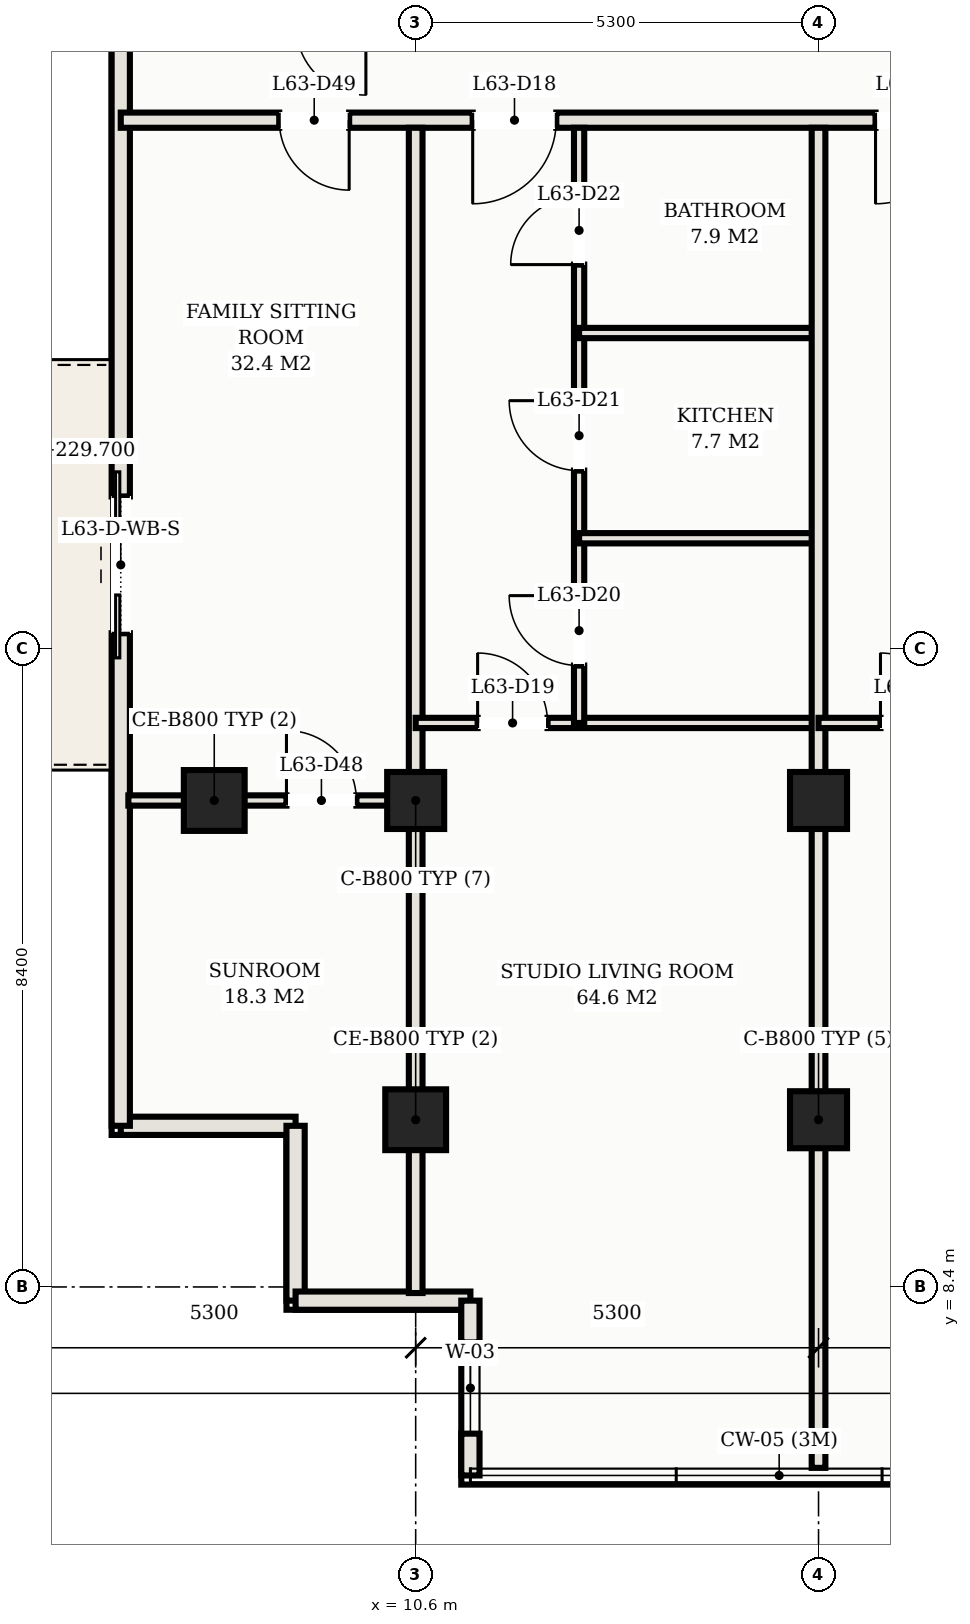
"""IFC4 building model, lengths in metres.
Left out: names, types, materials, properties, quantities, classifications, styles, units other than length and angle.
Written with IfcOpenShell. Run it as: python <this file> out.ifc"""

import sys

from ifc_helpers import new_model, si_unit, direction, frame, frame_2d, origin, origin_2d, place, context, subcontext, project, spatial, rectangle, hollow_rectangle, extrude, element, fill, save


model = new_model("IFC4")
c1 = context("Model", 3, precision=1e-05, world=origin(), true_north=direction((0.0, 1.0)))
c2 = subcontext(c1, "Body", "Model", "MODEL_VIEW")
j1 = project(units=[si_unit("LENGTHUNIT", "METRE"), si_unit("PLANEANGLEUNIT", "RADIAN")], contexts=[c1])
p1 = place(None, origin())
s1 = spatial("IfcSite", under=j1, at=p1, CompositionType="ELEMENT")
p2 = place(p1, origin())
s2 = spatial("IfcBuilding", under=s1, at=p2, CompositionType="ELEMENT")
p3 = place(p2, frame((0.0, 0.0, 229.7)))
s3 = spatial("IfcBuildingStorey", under=s2, at=p3, CompositionType="ELEMENT", Elevation=229.7)
p4 = place(p3, frame((10.6, 14.8, 0.0), z_axis=(0.0, 0.0, 1.0), x_axis=(1.0, 0.0, 0.0)))
e1 = element("IfcColumn", 1, at=p4, inside=s3, PredefinedType="COLUMN", context=c2, shape_type="SweptSolid", body=[
    extrude(hollow_rectangle(XDim=0.75, YDim=0.75, WallThickness=0.025, at=origin_2d()), origin(), (0.0, 0.0, 1.0), 3.3),
])
p5 = place(p3, frame((10.6, 10.6, 0.0), z_axis=(0.0, 0.0, 1.0), x_axis=(1.0, 0.0, 0.0)))
e2 = element("IfcColumn", 2, at=p5, inside=s3, PredefinedType="COLUMN", context=c2, shape_type="SweptSolid", body=[
    extrude(hollow_rectangle(XDim=0.8, YDim=0.8, WallThickness=0.028, at=origin_2d()), origin(), (0.0, 0.0, 1.0), 3.3),
])
for number, where, z_axis, x_axis in (
    (3, (15.9, 14.8, 0.0), (0.0, 0.0, 1.0), (1.0, 0.0, 0.0)),
    (4, (15.9, 10.6, 0.0), (0.0, 0.0, 1.0), (1.0, 0.0, 0.0)),
):
    element("IfcColumn", number, at=place(p3, frame(where, z_axis=z_axis, x_axis=x_axis)), inside=s3, PredefinedType="COLUMN", context=c2, shape_type="SweptSolid", body=[
        extrude(hollow_rectangle(XDim=0.75, YDim=0.75, WallThickness=0.025, at=origin_2d()), origin(), (0.0, 0.0, 1.0), 3.3),
    ])
p6 = place(p3, frame((7.95, 14.8, 0.0), z_axis=(0.0, 0.0, 1.0), x_axis=(1.0, 0.0, 0.0)))
e5 = element("IfcColumn", 5, at=p6, inside=s3, PredefinedType="COLUMN", context=c2, shape_type="SweptSolid", body=[
    extrude(hollow_rectangle(XDim=0.8, YDim=0.8, WallThickness=0.028, at=origin_2d()), origin(), (0.0, 0.0, 1.0), 3.264),
])
for number, where, z_axis, x_axis in (
    (6, (6.72, 10.52, 0.0), (0.0, 0.0, 1.0), (1.0, 0.0, 0.0)),
    (7, (9.02, 10.52, 0.0), (0.0, 0.0, 1.0), (0.0, -1.0, 0.0)),
    (8, (9.02, 8.22, 0.0), (0.0, 0.0, 1.0), (1.0, 0.0, 0.0)),
):
    element("IfcWall", number, at=place(p3, frame(where, z_axis=z_axis, x_axis=x_axis)), inside=s3, PredefinedType="SOLIDWALL", context=c2, shape_type="SweptSolid", body=[
        extrude(rectangle(XDim=2.3, YDim=0.24, at=frame_2d((1.15, 0.0))), origin(), (0.0, 0.0, 1.0), 3.11),
    ])
p7 = place(p3, frame((11.32, 8.22, 0.0), z_axis=(0.0, 0.0, 1.0), x_axis=(0.0, -1.0, 0.0)))
e9 = element("IfcWall", 9, at=p7, inside=s3, PredefinedType="SOLIDWALL", context=c2, shape_type="SweptSolid", body=[
    extrude(rectangle(XDim=2.3, YDim=0.24, at=frame_2d((1.15, 0.0))), origin(), (0.0, 0.0, 1.0), 3.11),
])
p8 = place(p7, frame((0.55, 0.0, 0.75)))
e10 = element("IfcOpeningElement", 10, at=p8, cuts=e9, PredefinedType="OPENING", context=c2, shape_type="SweptSolid", body=[
    extrude(rectangle(XDim=1.2, YDim=1.5, at=frame_2d((0.6, 0.75))), frame((0.0, 0.13, 0.0), z_axis=(0.0, -1.0, 0.0), x_axis=(1.0, 0.0, 0.0)), (0.0, 0.0, 1.0), 0.26),
])
p9 = place(p3, frame((6.72, 36.93, 0.0), z_axis=(0.0, 0.0, 1.0), x_axis=(0.0, -1.0, 0.0)))
e11 = element("IfcWall", 11, at=p9, inside=s3, PredefinedType="SOLIDWALL", context=c2, shape_type="SweptSolid", body=[
    extrude(rectangle(XDim=26.41, YDim=0.24, at=frame_2d((13.205, 0.0))), origin(), (0.0, 0.0, 1.0), 3.11),
])
p10 = place(p9, frame((18.13, 0.0, 0.0)))
e12 = element("IfcOpeningElement", 12, at=p10, cuts=e11, PredefinedType="OPENING", context=c2, shape_type="SweptSolid", body=[
    extrude(rectangle(XDim=1.8, YDim=2.2, at=frame_2d((0.9, 1.1))), frame((0.0, 0.13, 0.0), z_axis=(0.0, -1.0, 0.0), x_axis=(1.0, 0.0, 0.0)), (0.0, 0.0, 1.0), 0.26),
])
p11 = place(p3, frame((6.72, 23.75, 0.0), z_axis=(0.0, 0.0, 1.0), x_axis=(1.0, 0.0, 0.0)))
e13 = element("IfcWall", 13, at=p11, inside=s3, PredefinedType="PARTITIONING", context=c2, shape_type="SweptSolid", body=[
    extrude(rectangle(XDim=39.56, YDim=0.2, at=frame_2d((19.78, 0.0))), origin(), (0.0, 0.0, 1.0), 2.43),
])
p12 = place(p11, frame((4.63, 0.0, 0.0)))
e14 = element("IfcOpeningElement", 14, at=p12, cuts=e13, PredefinedType="OPENING", context=c2, shape_type="SweptSolid", body=[
    extrude(rectangle(XDim=1.1, YDim=2.25, at=frame_2d((0.55, 1.125))), frame((0.0, 0.11, 0.0), z_axis=(0.0, -1.0, 0.0), x_axis=(1.0, 0.0, 0.0)), (0.0, 0.0, 1.0), 0.22),
])
p13 = place(p11, frame((9.93, 0.0, 0.0)))
e15 = element("IfcOpeningElement", 15, at=p13, cuts=e13, PredefinedType="OPENING", context=c2, shape_type="SweptSolid", body=[
    extrude(rectangle(XDim=1.1, YDim=2.25, at=frame_2d((0.55, 1.125))), frame((0.0, 0.11, 0.0), z_axis=(0.0, -1.0, 0.0), x_axis=(1.0, 0.0, 0.0)), (0.0, 0.0, 1.0), 0.22),
])
p14 = place(p11, frame((15.23, 0.0, 0.0)))
e16 = element("IfcOpeningElement", 16, at=p14, cuts=e13, PredefinedType="OPENING", context=c2, shape_type="SweptSolid", body=[
    extrude(rectangle(XDim=1.1, YDim=2.25, at=frame_2d((0.55, 1.125))), frame((0.0, 0.11, 0.0), z_axis=(0.0, -1.0, 0.0), x_axis=(1.0, 0.0, 0.0)), (0.0, 0.0, 1.0), 0.22),
])
p15 = place(p11, frame((20.73, 0.0, 0.0)))
e17 = element("IfcOpeningElement", 17, at=p15, cuts=e13, PredefinedType="OPENING", context=c2, shape_type="SweptSolid", body=[
    extrude(rectangle(XDim=1.1, YDim=2.25, at=frame_2d((0.55, 1.125))), frame((0.0, 0.11, 0.0), z_axis=(0.0, -1.0, 0.0), x_axis=(1.0, 0.0, 0.0)), (0.0, 0.0, 1.0), 0.22),
])
p16 = place(p11, frame((25.83, 0.0, 0.0)))
e18 = element("IfcOpeningElement", 18, at=p16, cuts=e13, PredefinedType="OPENING", context=c2, shape_type="SweptSolid", body=[
    extrude(rectangle(XDim=1.1, YDim=2.25, at=frame_2d((0.55, 1.125))), frame((0.0, 0.11, 0.0), z_axis=(0.0, -1.0, 0.0), x_axis=(1.0, 0.0, 0.0)), (0.0, 0.0, 1.0), 0.22),
])
p17 = place(p11, frame((31.13, 0.0, 0.0)))
e19 = element("IfcOpeningElement", 19, at=p17, cuts=e13, PredefinedType="OPENING", context=c2, shape_type="SweptSolid", body=[
    extrude(rectangle(XDim=1.1, YDim=2.25, at=frame_2d((0.55, 1.125))), frame((0.0, 0.11, 0.0), z_axis=(0.0, -1.0, 0.0), x_axis=(1.0, 0.0, 0.0)), (0.0, 0.0, 1.0), 0.22),
])
p18 = place(p11, frame((2.085, 0.0, 0.0)))
e20 = element("IfcOpeningElement", 20, at=p18, cuts=e13, PredefinedType="OPENING", context=c2, shape_type="SweptSolid", body=[
    extrude(rectangle(XDim=0.92, YDim=2.15, at=frame_2d((0.46, 1.075))), frame((0.0, 0.11, 0.0), z_axis=(0.0, -1.0, 0.0), x_axis=(1.0, 0.0, 0.0)), (0.0, 0.0, 1.0), 0.22),
])
p19 = place(p11, frame((36.555, 0.0, 0.0)))
e21 = element("IfcOpeningElement", 21, at=p19, cuts=e13, PredefinedType="OPENING", context=c2, shape_type="SweptSolid", body=[
    extrude(rectangle(XDim=0.92, YDim=2.15, at=frame_2d((0.46, 1.075))), frame((0.0, 0.11, 0.0), z_axis=(0.0, -1.0, 0.0), x_axis=(1.0, 0.0, 0.0)), (0.0, 0.0, 1.0), 0.22),
])
p20 = place(p3, frame((10.6, 8.32, 0.0), z_axis=(0.0, 0.0, 1.0), x_axis=(0.0, 1.0, 0.0)))
e22 = element("IfcWall", 22, at=p20, inside=s3, PredefinedType="PARTITIONING", context=c2, shape_type="SweptSolid", body=[
    extrude(rectangle(XDim=15.33, YDim=0.18, at=frame_2d((7.665, 0.0))), origin(), (0.0, 0.0, 1.0), 2.43),
])
p21 = place(p3, frame((10.6, 15.82, 0.0), z_axis=(0.0, 0.0, 1.0), x_axis=(1.0, 0.0, 0.0)))
e23 = element("IfcWall", 23, at=p21, inside=s3, PredefinedType="PARTITIONING", context=c2, shape_type="SweptSolid", body=[
    extrude(rectangle(XDim=5.3, YDim=0.135, at=frame_2d((2.65, 0.0))), origin(), (0.0, 0.0, 1.0), 2.43),
])
p22 = place(p21, frame((0.815, 0.0, 0.0)))
e24 = element("IfcOpeningElement", 24, at=p22, cuts=e23, PredefinedType="OPENING", context=c2, shape_type="SweptSolid", body=[
    extrude(rectangle(XDim=0.92, YDim=2.15, at=frame_2d((0.46, 1.075))), frame((0.0, 0.078, 0.0), z_axis=(0.0, -1.0, 0.0), x_axis=(1.0, 0.0, 0.0)), (0.0, 0.0, 1.0), 0.155),
])
p23 = place(p3, frame((12.75, 15.82, 0.0), z_axis=(0.0, 0.0, 1.0), x_axis=(0.0, 1.0, 0.0)))
e25 = element("IfcWall", 25, at=p23, inside=s3, PredefinedType="PARTITIONING", context=c2, shape_type="SweptSolid", body=[
    extrude(rectangle(XDim=7.83, YDim=0.135, at=frame_2d((3.915, 0.0))), origin(), (0.0, 0.0, 1.0), 2.43),
])
p24 = place(p23, frame((0.755, 0.0, 0.0)))
e26 = element("IfcOpeningElement", 26, at=p24, cuts=e25, PredefinedType="OPENING", context=c2, shape_type="SweptSolid", body=[
    extrude(rectangle(XDim=0.92, YDim=2.15, at=frame_2d((0.46, 1.075))), frame((0.0, 0.078, 0.0), z_axis=(0.0, -1.0, 0.0), x_axis=(1.0, 0.0, 0.0)), (0.0, 0.0, 1.0), 0.155),
])
p25 = place(p23, frame((3.32, 0.0, 0.0)))
e27 = element("IfcOpeningElement", 27, at=p25, cuts=e25, PredefinedType="OPENING", context=c2, shape_type="SweptSolid", body=[
    extrude(rectangle(XDim=0.92, YDim=2.15, at=frame_2d((0.46, 1.075))), frame((0.0, 0.078, 0.0), z_axis=(0.0, -1.0, 0.0), x_axis=(1.0, 0.0, 0.0)), (0.0, 0.0, 1.0), 0.155),
])
p26 = place(p23, frame((6.03, 0.0, 0.0)))
e28 = element("IfcOpeningElement", 28, at=p26, cuts=e25, PredefinedType="OPENING", context=c2, shape_type="SweptSolid", body=[
    extrude(rectangle(XDim=0.9, YDim=2.15, at=frame_2d((0.45, 1.075))), frame((0.0, 0.078, 0.0), z_axis=(0.0, -1.0, 0.0), x_axis=(1.0, 0.0, 0.0)), (0.0, 0.0, 1.0), 0.155),
])
for number, where, z_axis, x_axis in (
    (29, (12.75, 18.25, 0.0), (0.0, 0.0, 1.0), (1.0, 0.0, 0.0)),
    (30, (12.75, 20.95, 0.0), (0.0, 0.0, 1.0), (1.0, 0.0, 0.0)),
):
    element("IfcWall", number, at=place(p3, frame(where, z_axis=z_axis, x_axis=x_axis)), inside=s3, PredefinedType="PARTITIONING", context=c2, shape_type="SweptSolid", body=[
        extrude(rectangle(XDim=3.15, YDim=0.135, at=frame_2d((1.575, 0.0))), origin(), (0.0, 0.0, 1.0), 2.43),
    ])
p27 = place(p3, frame((15.9, 6.02, 0.0), z_axis=(0.0, 0.0, 1.0), x_axis=(0.0, 1.0, 0.0)))
e31 = element("IfcWall", 31, at=p27, inside=s3, PredefinedType="PARTITIONING", context=c2, shape_type="SweptSolid", body=[
    extrude(rectangle(XDim=17.63, YDim=0.18, at=frame_2d((8.815, 0.0))), origin(), (0.0, 0.0, 1.0), 2.43),
])
p28 = place(p3, frame((15.9, 15.82, 0.0), z_axis=(0.0, 0.0, 1.0), x_axis=(1.0, 0.0, 0.0)))
e32 = element("IfcWall", 32, at=p28, inside=s3, PredefinedType="PARTITIONING", context=c2, shape_type="SweptSolid", body=[
    extrude(rectangle(XDim=5.3, YDim=0.135, at=frame_2d((2.65, 0.0))), origin(), (0.0, 0.0, 1.0), 2.43),
])
p29 = place(p28, frame((0.815, 0.0, 0.0)))
e33 = element("IfcOpeningElement", 33, at=p29, cuts=e32, PredefinedType="OPENING", context=c2, shape_type="SweptSolid", body=[
    extrude(rectangle(XDim=0.92, YDim=2.15, at=frame_2d((0.46, 1.075))), frame((0.0, 0.078, 0.0), z_axis=(0.0, -1.0, 0.0), x_axis=(1.0, 0.0, 0.0)), (0.0, 0.0, 1.0), 0.155),
])
p30 = place(p3, frame((6.82, 14.8, 0.0), z_axis=(0.0, 0.0, 1.0), x_axis=(1.0, 0.0, 0.0)))
e34 = element("IfcWall", 34, at=p30, inside=s3, PredefinedType="PARTITIONING", context=c2, shape_type="SweptSolid", body=[
    extrude(rectangle(XDim=3.78, YDim=0.135, at=frame_2d((1.89, 0.0))), origin(), (0.0, 0.0, 1.0), 2.43),
])
p31 = place(p30, frame((2.08, 0.0, 0.0)))
e35 = element("IfcOpeningElement", 35, at=p31, cuts=e34, PredefinedType="OPENING", context=c2, shape_type="SweptSolid", body=[
    extrude(rectangle(XDim=0.92, YDim=2.15, at=frame_2d((0.46, 1.075))), frame((0.0, 0.078, 0.0), z_axis=(0.0, -1.0, 0.0), x_axis=(1.0, 0.0, 0.0)), (0.0, 0.0, 1.0), 0.155),
])
p32 = place(p8, origin())
e36 = element("IfcWindow", 36, at=p32, inside=s3, PartitioningType="SINGLE_PANEL", PredefinedType="WINDOW", context=c2, shape_type="SweptSolid", body=[
    extrude(rectangle(XDim=1.2, YDim=1.5, at=frame_2d((0.6, 0.75))), frame((0.0, 0.03, 0.0), z_axis=(0.0, -1.0, 0.0), x_axis=(1.0, 0.0, 0.0)), (0.0, 0.0, 1.0), 0.06),
])
fill(e10, e36)
p33 = place(p10, frame((1.8, 0.0, 0.0), z_axis=(0.0, 0.0, 1.0), x_axis=(-1.0, 0.0, 0.0)))
e37 = element("IfcDoor", 37, at=p33, inside=s3, OperationType="DOUBLE_DOOR_SLIDING", PredefinedType="DOOR", context=c2, shape_type="SweptSolid", body=[
    extrude(rectangle(XDim=1.8, YDim=2.2, at=frame_2d((0.9, 1.1))), frame((0.0, 0.025, 0.0), z_axis=(0.0, -1.0, 0.0), x_axis=(1.0, 0.0, 0.0)), (0.0, 0.0, 1.0), 0.05),
])
fill(e12, e37)
p34 = place(p12, frame((1.1, 0.0, 0.0), z_axis=(0.0, 0.0, 1.0), x_axis=(-1.0, 0.0, 0.0)))
e38 = element("IfcDoor", 38, at=p34, inside=s3, OperationType="SINGLE_SWING_RIGHT", PredefinedType="DOOR", context=c2, shape_type="SweptSolid", body=[
    extrude(rectangle(XDim=1.1, YDim=2.25, at=frame_2d((0.55, 1.125))), frame((0.0, 0.025, 0.0), z_axis=(0.0, -1.0, 0.0), x_axis=(1.0, 0.0, 0.0)), (0.0, 0.0, 1.0), 0.05),
])
fill(e14, e38)
p35 = place(p22, origin())
e39 = element("IfcDoor", 39, at=p35, inside=s3, OperationType="SINGLE_SWING_LEFT", PredefinedType="DOOR", context=c2, shape_type="SweptSolid", body=[
    extrude(rectangle(XDim=0.92, YDim=2.15, at=frame_2d((0.46, 1.075))), frame((0.0, 0.025, 0.0), z_axis=(0.0, -1.0, 0.0), x_axis=(1.0, 0.0, 0.0)), (0.0, 0.0, 1.0), 0.05),
])
fill(e24, e39)
p36 = place(p24, origin())
e40 = element("IfcDoor", 40, at=p36, inside=s3, OperationType="SINGLE_SWING_RIGHT", PredefinedType="DOOR", context=c2, shape_type="SweptSolid", body=[
    extrude(rectangle(XDim=0.92, YDim=2.15, at=frame_2d((0.46, 1.075))), frame((0.0, 0.025, 0.0), z_axis=(0.0, -1.0, 0.0), x_axis=(1.0, 0.0, 0.0)), (0.0, 0.0, 1.0), 0.05),
])
fill(e26, e40)
p37 = place(p25, origin())
e41 = element("IfcDoor", 41, at=p37, inside=s3, OperationType="SINGLE_SWING_RIGHT", PredefinedType="DOOR", context=c2, shape_type="SweptSolid", body=[
    extrude(rectangle(XDim=0.92, YDim=2.15, at=frame_2d((0.46, 1.075))), frame((0.0, 0.025, 0.0), z_axis=(0.0, -1.0, 0.0), x_axis=(1.0, 0.0, 0.0)), (0.0, 0.0, 1.0), 0.05),
])
fill(e27, e41)
p38 = place(p26, origin())
e42 = element("IfcDoor", 42, at=p38, inside=s3, OperationType="SINGLE_SWING_LEFT", PredefinedType="DOOR", context=c2, shape_type="SweptSolid", body=[
    extrude(rectangle(XDim=0.9, YDim=2.15, at=frame_2d((0.45, 1.075))), frame((0.0, 0.025, 0.0), z_axis=(0.0, -1.0, 0.0), x_axis=(1.0, 0.0, 0.0)), (0.0, 0.0, 1.0), 0.05),
])
fill(e28, e42)
p39 = place(p13, frame((1.1, 0.0, 0.0), z_axis=(0.0, 0.0, 1.0), x_axis=(-1.0, 0.0, 0.0)))
e43 = element("IfcDoor", 43, at=p39, inside=s3, OperationType="SINGLE_SWING_RIGHT", PredefinedType="DOOR", context=c2, shape_type="SweptSolid", body=[
    extrude(rectangle(XDim=1.1, YDim=2.25, at=frame_2d((0.55, 1.125))), frame((0.0, 0.025, 0.0), z_axis=(0.0, -1.0, 0.0), x_axis=(1.0, 0.0, 0.0)), (0.0, 0.0, 1.0), 0.05),
])
fill(e15, e43)
p40 = place(p29, origin())
e44 = element("IfcDoor", 44, at=p40, inside=s3, OperationType="SINGLE_SWING_LEFT", PredefinedType="DOOR", context=c2, shape_type="SweptSolid", body=[
    extrude(rectangle(XDim=0.92, YDim=2.15, at=frame_2d((0.46, 1.075))), frame((0.0, 0.025, 0.0), z_axis=(0.0, -1.0, 0.0), x_axis=(1.0, 0.0, 0.0)), (0.0, 0.0, 1.0), 0.05),
])
fill(e33, e44)
p41 = place(p31, origin())
e45 = element("IfcDoor", 45, at=p41, inside=s3, OperationType="SINGLE_SWING_LEFT", PredefinedType="DOOR", context=c2, shape_type="SweptSolid", body=[
    extrude(rectangle(XDim=0.92, YDim=2.15, at=frame_2d((0.46, 1.075))), frame((0.0, 0.025, 0.0), z_axis=(0.0, -1.0, 0.0), x_axis=(1.0, 0.0, 0.0)), (0.0, 0.0, 1.0), 0.05),
])
fill(e35, e45)
p42 = place(p18, frame((0.92, 0.0, 0.0), z_axis=(0.0, 0.0, 1.0), x_axis=(-1.0, 0.0, 0.0)))
e46 = element("IfcDoor", 46, at=p42, inside=s3, OperationType="SINGLE_SWING_LEFT", PredefinedType="DOOR", context=c2, shape_type="SweptSolid", body=[
    extrude(rectangle(XDim=0.92, YDim=2.15, at=frame_2d((0.46, 1.075))), frame((0.0, 0.025, 0.0), z_axis=(0.0, -1.0, 0.0), x_axis=(1.0, 0.0, 0.0)), (0.0, 0.0, 1.0), 0.05),
])
fill(e20, e46)
save(model, sys.argv[1])
